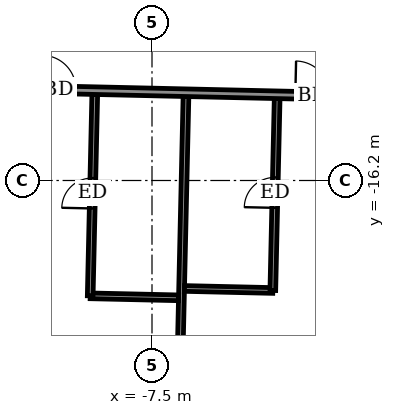
"""IFC4 building model, lengths in metres.
Left out: names, types, materials, properties, quantities, classifications, styles, units other than length and angle.
Written with IfcOpenShell. Run it as: python <this file> out.ifc"""

import sys

from ifc_helpers import new_model, si_unit, direction, frame, frame_2d, origin, place, context, subcontext, project, spatial, rectangle, extrude, element, fill, save


model = new_model("IFC4")
c1 = context("Model", 3, precision=1e-05, world=origin(), true_north=direction((0.0, 1.0)))
c2 = subcontext(c1, "Body", "Model", "MODEL_VIEW")
j1 = project(units=[si_unit("LENGTHUNIT", "METRE"), si_unit("PLANEANGLEUNIT", "RADIAN")], contexts=[c1])
p1 = place(None, origin())
s1 = spatial("IfcSite", under=j1, at=p1, CompositionType="ELEMENT")
p2 = place(p1, origin())
s2 = spatial("IfcBuilding", under=s1, at=p2, CompositionType="ELEMENT")
p3 = place(p2, frame((0.0, 0.0, 309.7)))
s3 = spatial("IfcBuildingStorey", under=s2, at=p3, CompositionType="ELEMENT", Elevation=309.7)
p4 = place(p3, frame((-6.866, -25.438, 0.0), z_axis=(0.0, 0.0, 1.0), x_axis=(0.022706391805, 0.999742176649, 0.0)))
e1 = element("IfcWall", 1, at=p4, inside=s3, PredefinedType="PARTITIONING", context=c2, shape_type="SweptSolid", body=[
    extrude(rectangle(XDim=11.451, YDim=0.15, at=frame_2d((5.726, 0.0))), origin(), (0.0, 0.0, 1.0), 2.5),
])
p5 = place(p3, frame((-9.126, -19.235, 0.0), z_axis=(0.0, 0.0, 1.0), x_axis=(0.999749954681, -0.022361308448, 0.0)))
e2 = element("IfcWall", 2, at=p5, inside=s3, PredefinedType="PARTITIONING", context=c2, shape_type="SweptSolid", body=[
    extrude(rectangle(XDim=2.325, YDim=0.15, at=frame_2d((1.163, 0.0))), origin(), (0.0, 0.0, 1.0), 3.05),
])
p6 = place(p3, frame((-9.126, -19.235, 0.0), z_axis=(0.0, 0.0, 1.0), x_axis=(0.022615729912, 0.999744231672, 0.0)))
e3 = element("IfcWall", 3, at=p6, inside=s3, PredefinedType="PARTITIONING", context=c2, shape_type="SweptSolid", body=[
    extrude(rectangle(XDim=5.301, YDim=0.15, at=frame_2d((2.65, 0.0))), origin(), (0.0, 0.0, 1.0), 3.05),
])
p7 = place(p6, frame((2.3, 0.0, 0.0)))
e4 = element("IfcOpeningElement", 4, at=p7, cuts=e3, PredefinedType="OPENING", context=c2, shape_type="SweptSolid", body=[
    extrude(rectangle(XDim=0.8, YDim=2.1, at=frame_2d((0.4, 1.05))), frame((0.0, 0.085, 0.0), z_axis=(0.0, -1.0, 0.0), x_axis=(1.0, 0.0, 0.0)), (0.0, 0.0, 1.0), 0.17),
])
p8 = place(p3, frame((-6.646, -19.041, 0.0), z_axis=(0.0, 0.0, 1.0), x_axis=(0.999740478815, -0.022781023197, 0.0)))
e5 = element("IfcWall", 5, at=p8, inside=s3, PredefinedType="PARTITIONING", context=c2, shape_type="SweptSolid", body=[
    extrude(rectangle(XDim=2.325, YDim=0.15, at=frame_2d((1.163, 0.0))), origin(), (0.0, 0.0, 1.0), 3.05),
])
p9 = place(p3, frame((-4.321, -19.094, 0.0), z_axis=(0.0, 0.0, 1.0), x_axis=(0.02257535817, 0.999745144126, 0.0)))
e6 = element("IfcWall", 6, at=p9, inside=s3, PredefinedType="PARTITIONING", context=c2, shape_type="SweptSolid", body=[
    extrude(rectangle(XDim=5.05, YDim=0.15, at=frame_2d((2.525, 0.0))), origin(), (0.0, 0.0, 1.0), 3.05),
])
p10 = place(p9, frame((2.175, 0.0, 0.0)))
e7 = element("IfcOpeningElement", 7, at=p10, cuts=e6, PredefinedType="OPENING", context=c2, shape_type="SweptSolid", body=[
    extrude(rectangle(XDim=0.8, YDim=2.1, at=frame_2d((0.4, 1.05))), frame((0.0, 0.085, 0.0), z_axis=(0.0, -1.0, 0.0), x_axis=(1.0, 0.0, 0.0)), (0.0, 0.0, 1.0), 0.17),
])
p11 = place(p3, frame((-31.347, -13.329, 0.0), z_axis=(0.0, 0.0, 1.0), x_axis=(0.999742613079, -0.022687168058, 0.0)))
e8 = element("IfcWall", 8, at=p11, inside=s3, PredefinedType="PARTITIONING", context=c2, shape_type="SweptSolid", body=[
    extrude(rectangle(XDim=58.799, YDim=0.2, at=frame_2d((29.399, 0.0))), origin(), (0.0, 0.0, 1.0), 3.05),
])
p12 = place(p11, frame((1.35, 0.0, 0.0)))
e9 = element("IfcOpeningElement", 9, at=p12, cuts=e8, PredefinedType="OPENING", context=c2, shape_type="SweptSolid", body=[
    extrude(rectangle(XDim=1.0, YDim=2.1, at=frame_2d((0.5, 1.05))), frame((0.0, 0.11, 0.0), z_axis=(0.0, -1.0, 0.0), x_axis=(1.0, 0.0, 0.0)), (0.0, 0.0, 1.0), 0.22),
])
p13 = place(p11, frame((5.95, 0.0, 0.0)))
e10 = element("IfcOpeningElement", 10, at=p13, cuts=e8, PredefinedType="OPENING", context=c2, shape_type="SweptSolid", body=[
    extrude(rectangle(XDim=0.9, YDim=2.1, at=frame_2d((0.45, 1.05))), frame((0.0, 0.11, 0.0), z_axis=(0.0, -1.0, 0.0), x_axis=(1.0, 0.0, 0.0)), (0.0, 0.0, 1.0), 0.22),
])
p14 = place(p11, frame((10.575, 0.0, 0.0)))
e11 = element("IfcOpeningElement", 11, at=p14, cuts=e8, PredefinedType="OPENING", context=c2, shape_type="SweptSolid", body=[
    extrude(rectangle(XDim=0.9, YDim=2.1, at=frame_2d((0.45, 1.05))), frame((0.0, 0.11, 0.0), z_axis=(0.0, -1.0, 0.0), x_axis=(1.0, 0.0, 0.0)), (0.0, 0.0, 1.0), 0.22),
])
p15 = place(p11, frame((12.425, 0.0, 0.0)))
e12 = element("IfcOpeningElement", 12, at=p15, cuts=e8, PredefinedType="OPENING", context=c2, shape_type="SweptSolid", body=[
    extrude(rectangle(XDim=0.9, YDim=2.1, at=frame_2d((0.45, 1.05))), frame((0.0, 0.11, 0.0), z_axis=(0.0, -1.0, 0.0), x_axis=(1.0, 0.0, 0.0)), (0.0, 0.0, 1.0), 0.22),
])
p16 = place(p11, frame((19.075, 0.0, 0.0)))
e13 = element("IfcOpeningElement", 13, at=p16, cuts=e8, PredefinedType="OPENING", context=c2, shape_type="SweptSolid", body=[
    extrude(rectangle(XDim=0.9, YDim=2.1, at=frame_2d((0.45, 1.05))), frame((0.0, 0.11, 0.0), z_axis=(0.0, -1.0, 0.0), x_axis=(1.0, 0.0, 0.0)), (0.0, 0.0, 1.0), 0.22),
])
p17 = place(p11, frame((20.95, 0.0, 0.0)))
e14 = element("IfcOpeningElement", 14, at=p17, cuts=e8, PredefinedType="OPENING", context=c2, shape_type="SweptSolid", body=[
    extrude(rectangle(XDim=0.9, YDim=2.1, at=frame_2d((0.45, 1.05))), frame((0.0, 0.11, 0.0), z_axis=(0.0, -1.0, 0.0), x_axis=(1.0, 0.0, 0.0)), (0.0, 0.0, 1.0), 0.22),
])
p18 = place(p11, frame((27.625, 0.0, 0.0)))
e15 = element("IfcOpeningElement", 15, at=p18, cuts=e8, PredefinedType="OPENING", context=c2, shape_type="SweptSolid", body=[
    extrude(rectangle(XDim=0.9, YDim=2.1, at=frame_2d((0.45, 1.05))), frame((0.0, 0.11, 0.0), z_axis=(0.0, -1.0, 0.0), x_axis=(1.0, 0.0, 0.0)), (0.0, 0.0, 1.0), 0.22),
])
p19 = place(p11, frame((29.475, 0.0, 0.0)))
e16 = element("IfcOpeningElement", 16, at=p19, cuts=e8, PredefinedType="OPENING", context=c2, shape_type="SweptSolid", body=[
    extrude(rectangle(XDim=0.9, YDim=2.1, at=frame_2d((0.45, 1.05))), frame((0.0, 0.11, 0.0), z_axis=(0.0, -1.0, 0.0), x_axis=(1.0, 0.0, 0.0)), (0.0, 0.0, 1.0), 0.22),
])
p20 = place(p11, frame((36.125, 0.0, 0.0)))
e17 = element("IfcOpeningElement", 17, at=p20, cuts=e8, PredefinedType="OPENING", context=c2, shape_type="SweptSolid", body=[
    extrude(rectangle(XDim=0.9, YDim=2.1, at=frame_2d((0.45, 1.05))), frame((0.0, 0.11, 0.0), z_axis=(0.0, -1.0, 0.0), x_axis=(1.0, 0.0, 0.0)), (0.0, 0.0, 1.0), 0.22),
])
p21 = place(p11, frame((37.95, 0.0, 0.0)))
e18 = element("IfcOpeningElement", 18, at=p21, cuts=e8, PredefinedType="OPENING", context=c2, shape_type="SweptSolid", body=[
    extrude(rectangle(XDim=0.9, YDim=2.1, at=frame_2d((0.45, 1.05))), frame((0.0, 0.11, 0.0), z_axis=(0.0, -1.0, 0.0), x_axis=(1.0, 0.0, 0.0)), (0.0, 0.0, 1.0), 0.22),
])
p22 = place(p11, frame((44.6, 0.0, 0.0)))
e19 = element("IfcOpeningElement", 19, at=p22, cuts=e8, PredefinedType="OPENING", context=c2, shape_type="SweptSolid", body=[
    extrude(rectangle(XDim=0.9, YDim=2.1, at=frame_2d((0.45, 1.05))), frame((0.0, 0.11, 0.0), z_axis=(0.0, -1.0, 0.0), x_axis=(1.0, 0.0, 0.0)), (0.0, 0.0, 1.0), 0.22),
])
p23 = place(p11, frame((46.475, 0.0, 0.0)))
e20 = element("IfcOpeningElement", 20, at=p23, cuts=e8, PredefinedType="OPENING", context=c2, shape_type="SweptSolid", body=[
    extrude(rectangle(XDim=0.9, YDim=2.1, at=frame_2d((0.45, 1.05))), frame((0.0, 0.11, 0.0), z_axis=(0.0, -1.0, 0.0), x_axis=(1.0, 0.0, 0.0)), (0.0, 0.0, 1.0), 0.22),
])
p24 = place(p11, frame((55.925, 0.0, 0.0)))
e21 = element("IfcOpeningElement", 21, at=p24, cuts=e8, PredefinedType="OPENING", context=c2, shape_type="SweptSolid", body=[
    extrude(rectangle(XDim=1.0, YDim=2.1, at=frame_2d((0.5, 1.05))), frame((0.0, 0.11, 0.0), z_axis=(0.0, -1.0, 0.0), x_axis=(1.0, 0.0, 0.0)), (0.0, 0.0, 1.0), 0.22),
])
p25 = place(p11, frame((51.0, 0.0, 0.0)))
e22 = element("IfcOpeningElement", 22, at=p25, cuts=e8, PredefinedType="OPENING", context=c2, shape_type="SweptSolid", body=[
    extrude(rectangle(XDim=0.9, YDim=2.1, at=frame_2d((0.45, 1.05))), frame((0.0, 0.11, 0.0), z_axis=(0.0, -1.0, 0.0), x_axis=(1.0, 0.0, 0.0)), (0.0, 0.0, 1.0), 0.22),
])
p26 = place(p17, origin())
e23 = element("IfcDoor", 23, at=p26, inside=s3, OperationType="SINGLE_SWING_RIGHT", PredefinedType="DOOR", context=c2, shape_type="SweptSolid", body=[
    extrude(rectangle(XDim=0.9, YDim=2.1, at=frame_2d((0.45, 1.05))), frame((0.0, 0.025, 0.0), z_axis=(0.0, -1.0, 0.0), x_axis=(1.0, 0.0, 0.0)), (0.0, 0.0, 1.0), 0.05),
])
fill(e14, e23)
p27 = place(p7, origin())
e24 = element("IfcDoor", 24, at=p27, inside=s3, OperationType="SINGLE_SWING_RIGHT", PredefinedType="DOOR", context=c2, shape_type="SweptSolid", body=[
    extrude(rectangle(XDim=0.8, YDim=2.1, at=frame_2d((0.4, 1.05))), frame((0.0, 0.025, 0.0), z_axis=(0.0, -1.0, 0.0), x_axis=(1.0, 0.0, 0.0)), (0.0, 0.0, 1.0), 0.05),
])
fill(e4, e24)
p28 = place(p18, origin())
e25 = element("IfcDoor", 25, at=p28, inside=s3, OperationType="SINGLE_SWING_LEFT", PredefinedType="DOOR", context=c2, shape_type="SweptSolid", body=[
    extrude(rectangle(XDim=0.9, YDim=2.1, at=frame_2d((0.45, 1.05))), frame((0.0, 0.025, 0.0), z_axis=(0.0, -1.0, 0.0), x_axis=(1.0, 0.0, 0.0)), (0.0, 0.0, 1.0), 0.05),
])
fill(e15, e25)
p29 = place(p10, origin())
e26 = element("IfcDoor", 26, at=p29, inside=s3, OperationType="SINGLE_SWING_LEFT", PredefinedType="DOOR", context=c2, shape_type="SweptSolid", body=[
    extrude(rectangle(XDim=0.8, YDim=2.1, at=frame_2d((0.4, 1.05))), frame((0.0, 0.025, 0.0), z_axis=(0.0, -1.0, 0.0), x_axis=(1.0, 0.0, 0.0)), (0.0, 0.0, 1.0), 0.05),
])
fill(e7, e26)
save(model, sys.argv[1])
